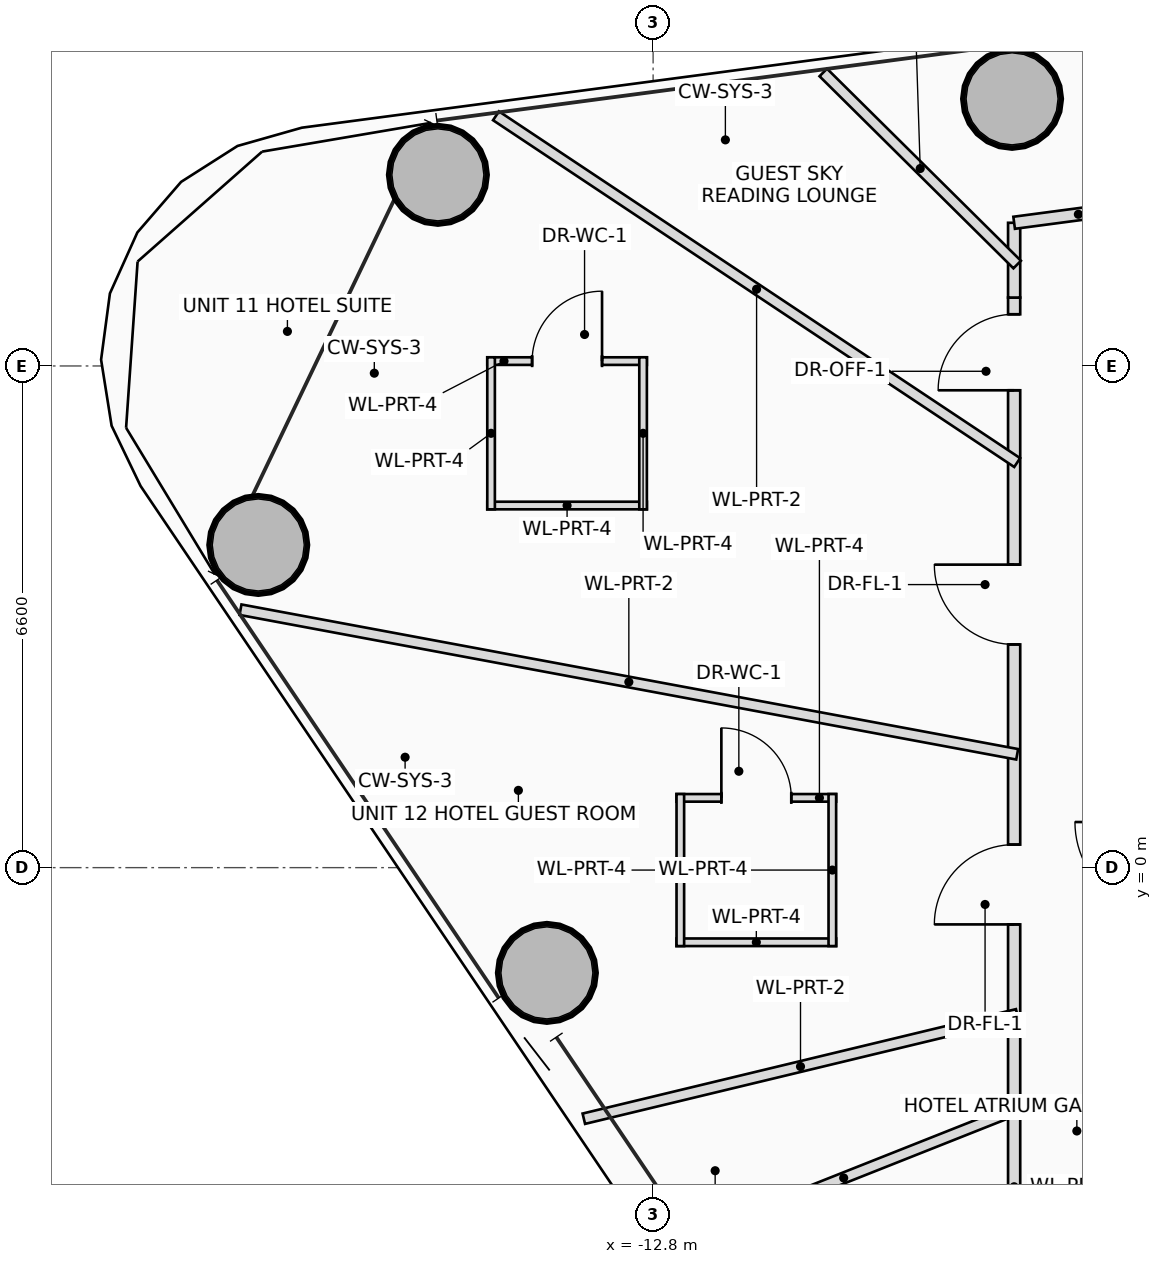
"""IFC4 building model, lengths in metres.
Left out: names, types, materials, properties, quantities, classifications, styles, units other than length and angle.
Written with IfcOpenShell. Run it as: python <this file> out.ifc"""

import sys

from ifc_helpers import new_model, si_unit, direction, frame, frame_2d, origin, origin_2d, place, context, subcontext, project, spatial, rectangle, hollow_circle, extrude, source, transform, mapped, element, fill, save


model = new_model("IFC4")
c1 = context("Model", 3, precision=1e-05, world=origin(), true_north=direction((0.0, 1.0)))
c2 = subcontext(c1, "Body", "Model", "MODEL_VIEW")
j1 = project(units=[si_unit("LENGTHUNIT", "METRE"), si_unit("PLANEANGLEUNIT", "RADIAN")], contexts=[c1])
p1 = place(None, origin())
s1 = spatial("IfcSite", under=j1, at=p1, CompositionType="ELEMENT")
p2 = place(p1, origin())
s2 = spatial("IfcBuilding", under=s1, at=p2, CompositionType="ELEMENT")
p3 = place(p2, frame((0.0, 0.0, 165.65)))
s3 = spatial("IfcBuildingStorey", under=s2, at=p3, CompositionType="ELEMENT", Elevation=165.65)
m1 = source(origin(), c2, "Body", "SweptSolid", [
    extrude(hollow_circle(Radius=0.65, WallThickness=0.045, at=origin_2d()), origin(), (0.0, 0.0, 1.0), 3.45),
])
for number, where, z_axis, x_axis in (
    (1, (-8.077, 10.114, 0.0), (0.0, 0.0, 1.0), (1.0, 0.0, 0.0)),
    (2, (-15.632, 9.114, 0.0), (0.0, 0.0, 1.0), (1.0, 0.0, 0.0)),
    (3, (-17.995, 4.245, 0.0), (0.0, 0.0, 1.0), (1.0, 0.0, 0.0)),
    (4, (-14.198, -1.385, 0.0), (0.0, 0.0, 1.0), (1.0, 0.0, 0.0)),
):
    element("IfcColumn", number, at=place(p3, frame(where, z_axis=z_axis, x_axis=x_axis)), inside=s3, PredefinedType="COLUMN", context=c2, shape_type="MappedRepresentation", body=[
        mapped(m1, transform((0.0, 0.0, 0.0), scale=1.0)),
    ])
p4 = place(p3, frame((-14.982, 6.664, 0.0), z_axis=(0.0, 0.0, 1.0), x_axis=(1.0, 0.0, 0.0)))
e5 = element("IfcWall", 5, at=p4, inside=s3, PredefinedType="PARTITIONING", context=c2, shape_type="SweptSolid", body=[
    extrude(rectangle(XDim=2.1, YDim=0.1, at=frame_2d((1.05, 0.0))), origin(), (0.0, 0.0, 1.0), 2.905),
])
p5 = place(p4, frame((0.59, 0.0, 0.0)))
e6 = element("IfcOpeningElement", 6, at=p5, cuts=e5, PredefinedType="OPENING", context=c2, shape_type="SweptSolid", body=[
    extrude(rectangle(XDim=0.92, YDim=2.1, at=frame_2d((0.46, 1.05))), frame((0.0, 0.06, 0.0), z_axis=(0.0, -1.0, 0.0), x_axis=(1.0, 0.0, 0.0)), (0.0, 0.0, 1.0), 0.12),
])
p6 = place(p3, frame((-12.882, 4.764, 0.0), z_axis=(0.0, 0.0, 1.0), x_axis=(-1.0, 0.0, 0.0)))
e7 = element("IfcWall", 7, at=p6, inside=s3, PredefinedType="PARTITIONING", context=c2, shape_type="SweptSolid", body=[
    extrude(rectangle(XDim=2.1, YDim=0.1, at=frame_2d((1.05, 0.0))), origin(), (0.0, 0.0, 1.0), 2.605),
])
p7 = place(p3, frame((-12.932, 6.714, 0.0), z_axis=(0.0, 0.0, 1.0), x_axis=(0.0, -1.0, 0.0)))
e8 = element("IfcWall", 8, at=p7, inside=s3, PredefinedType="PARTITIONING", context=c2, shape_type="SweptSolid", body=[
    extrude(rectangle(XDim=2.0, YDim=0.1, at=frame_2d((1.0, 0.0))), origin(), (0.0, 0.0, 1.0), 2.605),
])
p8 = place(p3, frame((-14.932, 4.714, 0.0), z_axis=(0.0, 0.0, 1.0), x_axis=(0.0, 1.0, 0.0)))
e9 = element("IfcWall", 9, at=p8, inside=s3, PredefinedType="PARTITIONING", context=c2, shape_type="SweptSolid", body=[
    extrude(rectangle(XDim=2.0, YDim=0.1, at=frame_2d((1.0, 0.0))), origin(), (0.0, 0.0, 1.0), 3.25),
])
p9 = place(p3, frame((-12.492, 0.918, 0.0), z_axis=(0.0, 0.0, 1.0), x_axis=(1.0, 0.0, 0.0)))
e10 = element("IfcWall", 10, at=p9, inside=s3, PredefinedType="PARTITIONING", context=c2, shape_type="SweptSolid", body=[
    extrude(rectangle(XDim=2.1, YDim=0.1, at=frame_2d((1.05, 0.0))), origin(), (0.0, 0.0, 1.0), 2.805),
])
p10 = place(p9, frame((0.59, 0.0, 0.0)))
e11 = element("IfcOpeningElement", 11, at=p10, cuts=e10, PredefinedType="OPENING", context=c2, shape_type="SweptSolid", body=[
    extrude(rectangle(XDim=0.92, YDim=2.1, at=frame_2d((0.46, 1.05))), frame((0.0, 0.06, 0.0), z_axis=(0.0, -1.0, 0.0), x_axis=(1.0, 0.0, 0.0)), (0.0, 0.0, 1.0), 0.12),
])
p11 = place(p3, frame((-10.392, -0.982, 0.0), z_axis=(0.0, 0.0, 1.0), x_axis=(-1.0, 0.0, 0.0)))
e12 = element("IfcWall", 12, at=p11, inside=s3, PredefinedType="PARTITIONING", context=c2, shape_type="SweptSolid", body=[
    extrude(rectangle(XDim=2.1, YDim=0.1, at=frame_2d((1.05, 0.0))), origin(), (0.0, 0.0, 1.0), 2.805),
])
for number, where, z_axis, x_axis in (
    (13, (-10.442, 0.968, 0.0), (0.0, 0.0, 1.0), (0.0, -1.0, 0.0)),
    (14, (-12.442, -1.032, 0.0), (0.0, 0.0, 1.0), (0.0, 1.0, 0.0)),
):
    element("IfcWall", number, at=place(p3, frame(where, z_axis=z_axis, x_axis=x_axis)), inside=s3, PredefinedType="PARTITIONING", context=c2, shape_type="SweptSolid", body=[
        extrude(rectangle(XDim=2.0, YDim=0.1, at=frame_2d((1.0, 0.0))), origin(), (0.0, 0.0, 1.0), 3.25),
    ])
p12 = place(p3, frame((-8.05, -7.5, 0.0), z_axis=(0.0, 0.0, 1.0), x_axis=(0.0, 1.0, 0.0)))
e15 = element("IfcWall", 15, at=p12, inside=s3, PredefinedType="PARTITIONING", context=c2, shape_type="SweptSolid", body=[
    extrude(rectangle(XDim=15.0, YDim=0.16, at=frame_2d((7.5, 0.0))), origin(), (0.0, 0.0, 1.0), 2.605),
])
p13 = place(p12, frame((6.753, 0.0, 0.0)))
e16 = element("IfcOpeningElement", 16, at=p13, cuts=e15, PredefinedType="OPENING", context=c2, shape_type="SweptSolid", body=[
    extrude(rectangle(XDim=1.05, YDim=2.2, at=frame_2d((0.525, 1.1))), frame((0.0, 0.09, 0.0), z_axis=(0.0, -1.0, 0.0), x_axis=(1.0, 0.0, 0.0)), (0.0, 0.0, 1.0), 0.18),
])
p14 = place(p12, frame((10.436, 0.0, 0.0)))
e17 = element("IfcOpeningElement", 17, at=p14, cuts=e15, PredefinedType="OPENING", context=c2, shape_type="SweptSolid", body=[
    extrude(rectangle(XDim=1.05, YDim=2.2, at=frame_2d((0.525, 1.1))), frame((0.0, 0.09, 0.0), z_axis=(0.0, -1.0, 0.0), x_axis=(1.0, 0.0, 0.0)), (0.0, 0.0, 1.0), 0.18),
])
p15 = place(p12, frame((13.78, 0.0, 0.0)))
e18 = element("IfcOpeningElement", 18, at=p15, cuts=e15, PredefinedType="OPENING", context=c2, shape_type="SweptSolid", body=[
    extrude(rectangle(XDim=1.0, YDim=2.25, at=frame_2d((0.5, 1.125))), frame((0.0, 0.09, 0.0), z_axis=(0.0, -1.0, 0.0), x_axis=(1.0, 0.0, 0.0)), (0.0, 0.0, 1.0), 0.18),
])
p16 = place(p3, frame((-8.05, 7.5, 0.0), z_axis=(0.0, 0.0, 1.0), x_axis=(0.0, 1.0, 0.0)))
e19 = element("IfcWall", 19, at=p16, inside=s3, PredefinedType="PARTITIONING", context=c2, shape_type="SweptSolid", body=[
    extrude(rectangle(XDim=0.984, YDim=0.16, at=frame_2d((0.492, 0.0))), origin(), (0.0, 0.0, 1.0), 2.805),
])
p17 = place(p3, frame((-8.05, 8.484, 0.0), z_axis=(0.0, 0.0, 1.0), x_axis=(0.991338869543, 0.131328769629, 0.0)))
e20 = element("IfcWall", 20, at=p17, inside=s3, PredefinedType="PARTITIONING", context=c2, shape_type="SweptSolid", body=[
    extrude(rectangle(XDim=1.705, YDim=0.16, at=frame_2d((0.852, 0.0))), origin(), (0.0, 0.0, 1.0), 2.605),
])
p18 = place(p3, frame((-8.01, 7.934, 0.0), z_axis=(0.0, 0.0, 1.0), x_axis=(-0.710464129117, 0.703733416315, 0.0)))
e21 = element("IfcWall", 21, at=p18, inside=s3, PredefinedType="PARTITIONING", context=c2, shape_type="SweptSolid", body=[
    extrude(rectangle(XDim=3.591, YDim=0.14, at=frame_2d((1.795, 0.0))), origin(), (0.0, 0.0, 1.0), 2.765),
])
p19 = place(p3, frame((-8.01, 5.329, 0.0), z_axis=(0.0, 0.0, 1.0), x_axis=(-0.832565256492, 0.553926975044, 0.0)))
e22 = element("IfcWall", 22, at=p19, inside=s3, PredefinedType="PARTITIONING", context=c2, shape_type="SweptSolid", body=[
    extrude(rectangle(XDim=8.236, YDim=0.14, at=frame_2d((4.118, 0.0))), origin(), (0.0, 0.0, 1.0), 2.605),
])
p20 = place(p3, frame((-8.01, 1.491, 0.0), z_axis=(0.0, 0.0, 1.0), x_axis=(-0.983113838534, 0.182995028575, 0.0)))
e23 = element("IfcWall", 23, at=p20, inside=s3, PredefinedType="PARTITIONING", context=c2, shape_type="SweptSolid", body=[
    extrude(rectangle(XDim=10.394, YDim=0.14, at=frame_2d((5.197, 0.0))), origin(), (0.0, 0.0, 1.0), 2.765),
])
p21 = place(p3, frame((-8.01, -1.93, 0.0), z_axis=(0.0, 0.0, 1.0), x_axis=(-0.972178712373, -0.23424037058, 0.0)))
e24 = element("IfcWall", 24, at=p21, inside=s3, PredefinedType="PARTITIONING", context=c2, shape_type="SweptSolid", body=[
    extrude(rectangle(XDim=5.865, YDim=0.14, at=frame_2d((2.932, 0.0))), origin(), (0.0, 0.0, 1.0), 2.605),
])
p22 = place(p3, frame((-8.01, -3.177, 0.0), z_axis=(0.0, 0.0, 1.0), x_axis=(-0.929545887112, -0.368706446586, 0.0)))
e25 = element("IfcWall", 25, at=p22, inside=s3, PredefinedType="PARTITIONING", context=c2, shape_type="SweptSolid", body=[
    extrude(rectangle(XDim=4.911, YDim=0.14, at=frame_2d((2.456, 0.0))), origin(), (0.0, 0.0, 1.0), 2.605),
])
p23 = place(p5, origin())
e26 = element("IfcDoor", 26, at=p23, inside=s3, OperationType="SINGLE_SWING_RIGHT", PredefinedType="DOOR", context=c2, shape_type="SweptSolid", body=[
    extrude(rectangle(XDim=0.92, YDim=2.1, at=frame_2d((0.46, 1.05))), frame((0.0, 0.025, 0.0), z_axis=(0.0, -1.0, 0.0), x_axis=(1.0, 0.0, 0.0)), (0.0, 0.0, 1.0), 0.05),
])
fill(e6, e26)
p24 = place(p10, origin())
e27 = element("IfcDoor", 27, at=p24, inside=s3, OperationType="SINGLE_SWING_LEFT", PredefinedType="DOOR", context=c2, shape_type="SweptSolid", body=[
    extrude(rectangle(XDim=0.92, YDim=2.1, at=frame_2d((0.46, 1.05))), frame((0.0, 0.025, 0.0), z_axis=(0.0, -1.0, 0.0), x_axis=(1.0, 0.0, 0.0)), (0.0, 0.0, 1.0), 0.05),
])
fill(e11, e27)
p25 = place(p13, origin())
e28 = element("IfcDoor", 28, at=p25, inside=s3, OperationType="SINGLE_SWING_LEFT", PredefinedType="DOOR", context=c2, shape_type="SweptSolid", body=[
    extrude(rectangle(XDim=1.05, YDim=2.2, at=frame_2d((0.525, 1.1))), frame((0.0, 0.025, 0.0), z_axis=(0.0, -1.0, 0.0), x_axis=(1.0, 0.0, 0.0)), (0.0, 0.0, 1.0), 0.05),
])
fill(e16, e28)
p26 = place(p14, origin())
e29 = element("IfcDoor", 29, at=p26, inside=s3, OperationType="SINGLE_SWING_RIGHT", PredefinedType="DOOR", context=c2, shape_type="SweptSolid", body=[
    extrude(rectangle(XDim=1.05, YDim=2.2, at=frame_2d((0.525, 1.1))), frame((0.0, 0.025, 0.0), z_axis=(0.0, -1.0, 0.0), x_axis=(1.0, 0.0, 0.0)), (0.0, 0.0, 1.0), 0.05),
])
fill(e17, e29)
p27 = place(p15, origin())
e30 = element("IfcDoor", 30, at=p27, inside=s3, OperationType="SINGLE_SWING_LEFT", PredefinedType="DOOR", context=c2, shape_type="SweptSolid", body=[
    extrude(rectangle(XDim=1.0, YDim=2.25, at=frame_2d((0.5, 1.125))), frame((0.0, 0.025, 0.0), z_axis=(0.0, -1.0, 0.0), x_axis=(1.0, 0.0, 0.0)), (0.0, 0.0, 1.0), 0.05),
])
fill(e18, e30)
save(model, sys.argv[1])
